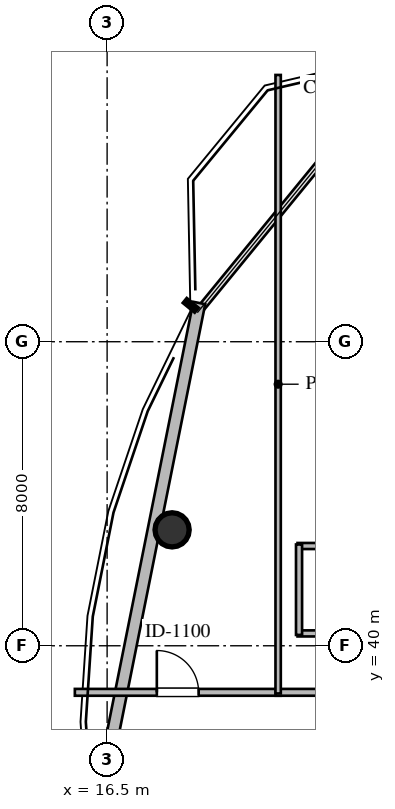
"""IFC4 building model, lengths in metres.
Left out: names, types, materials, properties, quantities, classifications, styles, units other than length and angle.
Written with IfcOpenShell. Run it as: python <this file> out.ifc"""

import sys

from ifc_helpers import new_model, si_unit, direction, frame, frame_2d, origin, origin_2d, place, context, subcontext, project, spatial, rectangle, circle, extrude, element, fill, save


model = new_model("IFC4")
c1 = context("Model", 3, precision=1e-05, world=origin(), true_north=direction((0.0, 1.0)))
c2 = subcontext(c1, "Body", "Model", "MODEL_VIEW")
j1 = project(units=[si_unit("LENGTHUNIT", "METRE"), si_unit("PLANEANGLEUNIT", "RADIAN")], contexts=[c1])
p1 = place(None, origin())
s1 = spatial("IfcSite", under=j1, at=p1, CompositionType="ELEMENT")
p2 = place(p1, origin())
s2 = spatial("IfcBuilding", under=s1, at=p2, CompositionType="ELEMENT")
p3 = place(p2, frame((0.0, 0.0, 289.0)))
s3 = spatial("IfcBuildingStorey", under=s2, at=p3, CompositionType="ELEMENT", Elevation=289.0)
p4 = place(p3, frame((18.21, 43.05, 0.0), z_axis=(0.0, 0.0, 1.0), x_axis=(1.0, 0.0, 0.0)))
e1 = element("IfcColumn", 1, at=p4, inside=s3, PredefinedType="COLUMN", context=c2, shape_type="SweptSolid", body=[
    extrude(circle(Radius=0.45, at=origin_2d()), origin(), (0.0, 0.0, 1.0), 3.8),
])
p5 = place(p3, frame((16.111, 34.999, 0.0), z_axis=(0.0, 0.0, 1.0), x_axis=(0.196720235208, 0.980459662128, 0.0)))
e2 = element("IfcWall", 2, at=p5, inside=s3, PredefinedType="STANDARD", context=c2, shape_type="SweptSolid", body=[
    extrude(rectangle(XDim=14.299, YDim=0.32, at=frame_2d((7.15, 0.0))), origin(), (0.0, 0.0, 1.0), 3.48),
])
p6 = place(p3, frame((21.51, 40.325, 0.0), z_axis=(0.0, 0.0, 1.0), x_axis=(1.0, 0.0, 0.0)))
e3 = element("IfcWall", 3, at=p6, inside=s3, PredefinedType="PLUMBINGWALL", context=c2, shape_type="SweptSolid", body=[
    extrude(rectangle(XDim=2.38, YDim=0.16, at=frame_2d((1.19, 0.0))), origin(), (0.0, 0.0, 1.0), 3.48),
])
p7 = place(p3, frame((21.51, 42.625, 0.0), z_axis=(0.0, 0.0, 1.0), x_axis=(1.0, 0.0, 0.0)))
e4 = element("IfcWall", 4, at=p7, inside=s3, PredefinedType="PLUMBINGWALL", context=c2, shape_type="SweptSolid", body=[
    extrude(rectangle(XDim=2.38, YDim=0.16, at=frame_2d((1.19, 0.0))), origin(), (0.0, 0.0, 1.0), 3.48),
])
p8 = place(p7, frame((0.74, 0.0, 0.0)))
e5 = element("IfcOpeningElement", 5, at=p8, cuts=e4, PredefinedType="OPENING", context=c2, shape_type="SweptSolid", body=[
    extrude(rectangle(XDim=0.92, YDim=2.1, at=frame_2d((0.46, 1.05))), frame((0.0, 0.09, 0.0), z_axis=(0.0, -1.0, 0.0), x_axis=(1.0, 0.0, 0.0)), (0.0, 0.0, 1.0), 0.18),
])
p9 = place(p3, frame((21.55, 40.285, 0.0), z_axis=(0.0, 0.0, 1.0), x_axis=(0.0, 1.0, 0.0)))
e6 = element("IfcWall", 6, at=p9, inside=s3, PredefinedType="PLUMBINGWALL", context=c2, shape_type="SweptSolid", body=[
    extrude(rectangle(XDim=2.38, YDim=0.16, at=frame_2d((1.19, 0.0))), origin(), (0.0, 0.0, 1.0), 2.47),
])
p10 = place(p3, frame((15.651, 38.775, 0.0), z_axis=(0.0, 0.0, 1.0), x_axis=(1.0, 0.0, 0.0)))
e7 = element("IfcWall", 7, at=p10, inside=s3, PredefinedType="PARTITIONING", context=c2, shape_type="SweptSolid", body=[
    extrude(rectangle(XDim=5.414, YDim=0.18, at=frame_2d((2.707, 0.0))), origin(), (0.0, 0.0, 1.0), 3.48),
])
p11 = place(p10, frame((2.157, 0.0, 0.0)))
e8 = element("IfcOpeningElement", 8, at=p11, cuts=e7, PredefinedType="OPENING", context=c2, shape_type="SweptSolid", body=[
    extrude(rectangle(XDim=1.1, YDim=2.1, at=frame_2d((0.55, 1.05))), frame((0.0, 0.1, 0.0), z_axis=(0.0, -1.0, 0.0), x_axis=(1.0, 0.0, 0.0)), (0.0, 0.0, 1.0), 0.2),
])
p12 = place(p3, frame((20.935, 38.775, 0.0), z_axis=(0.0, 0.0, 1.0), x_axis=(1.0, 0.0, 0.0)))
e9 = element("IfcWall", 9, at=p12, inside=s3, PredefinedType="PARTITIONING", context=c2, shape_type="SweptSolid", body=[
    extrude(rectangle(XDim=5.38, YDim=0.18, at=frame_2d((2.69, 0.0))), origin(), (0.0, 0.0, 1.0), 3.48),
])
p13 = place(p12, frame((2.14, 0.0, 0.0)))
e10 = element("IfcOpeningElement", 10, at=p13, cuts=e9, PredefinedType="OPENING", context=c2, shape_type="SweptSolid", body=[
    extrude(rectangle(XDim=1.1, YDim=2.1, at=frame_2d((0.55, 1.05))), frame((0.0, 0.1, 0.0), z_axis=(0.0, -1.0, 0.0), x_axis=(1.0, 0.0, 0.0)), (0.0, 0.0, 1.0), 0.2),
])
p14 = place(p3, frame((21.0, 55.019, 0.0), z_axis=(0.0, 0.0, 1.0), x_axis=(0.0, -1.0, 0.0)))
e11 = element("IfcWall", 11, at=p14, inside=s3, PredefinedType="PARTITIONING", context=c2, shape_type="SweptSolid", body=[
    extrude(rectangle(XDim=16.274, YDim=0.14, at=frame_2d((8.137, 0.0))), origin(), (0.0, 0.0, 1.0), 3.48),
])
p15 = place(p11, origin())
e12 = element("IfcDoor", 12, at=p15, inside=s3, OperationType="SINGLE_SWING_LEFT", PredefinedType="DOOR", context=c2, shape_type="SweptSolid", body=[
    extrude(rectangle(XDim=1.1, YDim=2.1, at=frame_2d((0.55, 1.05))), frame((0.0, 0.025, 0.0), z_axis=(0.0, -1.0, 0.0), x_axis=(1.0, 0.0, 0.0)), (0.0, 0.0, 1.0), 0.05),
])
fill(e8, e12)
save(model, sys.argv[1])
